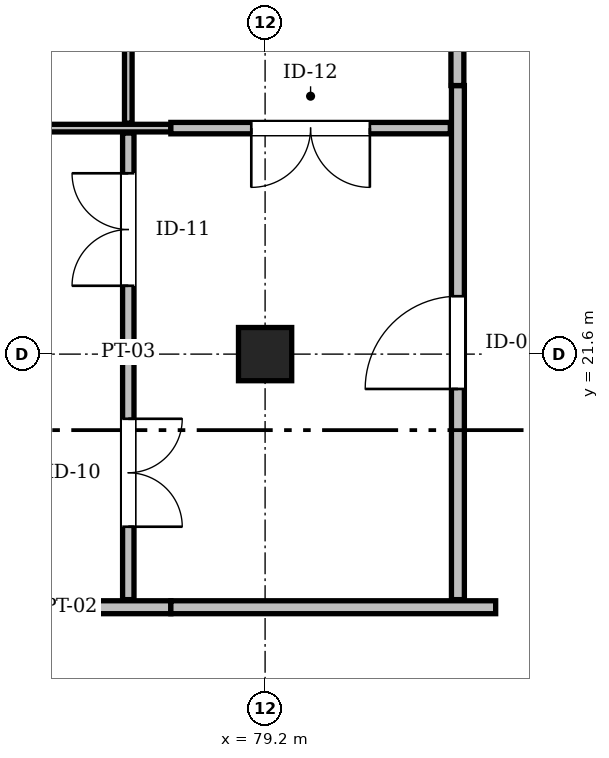
"""IFC4 building model, lengths in metres.
Left out: names, types, materials, properties, quantities, classifications, styles, units other than length and angle.
Written with IfcOpenShell. Run it as: python <this file> out.ifc"""

import sys

from ifc_helpers import new_model, si_unit, direction, frame, frame_2d, origin, origin_2d, place, context, subcontext, project, spatial, rectangle, extrude, element, fill, save


model = new_model("IFC4")
c1 = context("Model", 3, precision=1e-05, world=origin(), true_north=direction((0.0, 1.0)))
c2 = subcontext(c1, "Body", "Model", "MODEL_VIEW")
j1 = project(units=[si_unit("LENGTHUNIT", "METRE"), si_unit("PLANEANGLEUNIT", "RADIAN")], contexts=[c1])
p1 = place(None, origin())
s1 = spatial("IfcSite", under=j1, at=p1, CompositionType="ELEMENT")
p2 = place(p1, origin())
s2 = spatial("IfcBuilding", under=s1, at=p2, CompositionType="ELEMENT")
p3 = place(p2, frame((0.0, 0.0, 18.9)))
s3 = spatial("IfcBuildingStorey", under=s2, at=p3, CompositionType="ELEMENT", Elevation=18.9)
p4 = place(p3, frame((79.2, 21.6, 0.0), z_axis=(0.0, 0.0, 1.0), x_axis=(1.0, 0.0, 0.0)))
e1 = element("IfcColumn", 1, at=p4, inside=s3, PredefinedType="COLUMN", context=c2, shape_type="SweptSolid", body=[
    extrude(rectangle(XDim=0.7, YDim=0.7, at=origin_2d()), origin(), (0.0, 0.0, 1.0), 4.5),
])
p5 = place(p3, frame((60.981, 18.27, 0.0), z_axis=(0.0, 0.0, 1.0), x_axis=(1.0, 0.0, 0.0)))
e2 = element("IfcWall", 2, at=p5, inside=s3, PredefinedType="PARTITIONING", context=c2, shape_type="SweptSolid", body=[
    extrude(rectangle(XDim=16.979, YDim=0.17, at=frame_2d((8.489, 0.0))), origin(), (0.0, 0.0, 1.0), 4.16),
])
p6 = place(p5, frame((7.569, 0.0, 0.0)))
e3 = element("IfcOpeningElement", 3, at=p6, cuts=e2, PredefinedType="OPENING", context=c2, shape_type="SweptSolid", body=[
    extrude(rectangle(XDim=1.84, YDim=2.3, at=frame_2d((0.92, 1.15))), frame((0.0, 0.097, 0.0), z_axis=(0.0, -1.0, 0.0), x_axis=(1.0, 0.0, 0.0)), (0.0, 0.0, 1.0), 0.194),
])
p7 = place(p3, frame((77.96, 18.27, 0.0), z_axis=(0.0, 0.0, 1.0), x_axis=(1.0, 0.0, 0.0)))
e4 = element("IfcWall", 4, at=p7, inside=s3, PredefinedType="PARTITIONING", context=c2, shape_type="SweptSolid", body=[
    extrude(rectangle(XDim=4.274, YDim=0.17, at=frame_2d((2.137, 0.0))), origin(), (0.0, 0.0, 1.0), 4.16),
])
p8 = place(p3, frame((81.737, 18.37, 0.0), z_axis=(0.0, 0.0, 1.0), x_axis=(0.0, 1.0, 0.0)))
e5 = element("IfcWall", 5, at=p8, inside=s3, PredefinedType="PARTITIONING", context=c2, shape_type="SweptSolid", body=[
    extrude(rectangle(XDim=6.763, YDim=0.17, at=frame_2d((3.382, 0.0))), origin(), (0.0, 0.0, 1.0), 4.16),
])
p9 = place(p8, frame((2.771, 0.0, 0.0)))
e6 = element("IfcOpeningElement", 6, at=p9, cuts=e5, PredefinedType="OPENING", context=c2, shape_type="SweptSolid", body=[
    extrude(rectangle(XDim=1.22, YDim=2.22, at=frame_2d((0.61, 1.11))), frame((0.0, 0.097, 0.0), z_axis=(0.0, -1.0, 0.0), x_axis=(1.0, 0.0, 0.0)), (0.0, 0.0, 1.0), 0.194),
])
p10 = place(p3, frame((81.73, 25.133, 0.0), z_axis=(0.0, 0.0, 1.0), x_axis=(0.0, 1.0, 0.0)))
e7 = element("IfcWall", 7, at=p10, inside=s3, PredefinedType="PARTITIONING", context=c2, shape_type="SweptSolid", body=[
    extrude(rectangle(XDim=23.854, YDim=0.17, at=frame_2d((11.927, 0.0))), origin(), (0.0, 0.0, 1.0), 4.16),
])
p11 = place(p10, frame((11.187, 0.0, 0.0)))
e8 = element("IfcOpeningElement", 8, at=p11, cuts=e7, PredefinedType="OPENING", context=c2, shape_type="SweptSolid", body=[
    extrude(rectangle(XDim=1.48, YDim=2.26, at=frame_2d((0.74, 1.13))), frame((0.0, 0.097, 0.0), z_axis=(0.0, -1.0, 0.0), x_axis=(1.0, 0.0, 0.0)), (0.0, 0.0, 1.0), 0.194),
])
p12 = place(p10, frame((20.303, 0.0, 1.05)))
e9 = element("IfcOpeningElement", 9, at=p12, cuts=e7, PredefinedType="OPENING", context=c2, shape_type="SweptSolid", body=[
    extrude(rectangle(XDim=3.1, YDim=1.15, at=frame_2d((1.55, 0.575))), frame((0.0, 0.097, 0.0), z_axis=(0.0, -1.0, 0.0), x_axis=(1.0, 0.0, 0.0)), (0.0, 0.0, 1.0), 0.194),
])
p13 = place(p3, frame((60.97, 24.573, 0.0), z_axis=(0.0, 0.0, 1.0), x_axis=(1.0, 0.0, 0.0)))
e10 = element("IfcWall", 10, at=p13, inside=s3, PredefinedType="PARTITIONING", context=c2, shape_type="SweptSolid", body=[
    extrude(rectangle(XDim=16.99, YDim=0.1, at=frame_2d((8.495, 0.0))), origin(), (0.0, 0.0, 1.0), 4.16),
])
p14 = place(p13, frame((7.535, 0.0, 0.0)))
e11 = element("IfcOpeningElement", 11, at=p14, cuts=e10, PredefinedType="OPENING", context=c2, shape_type="SweptSolid", body=[
    extrude(rectangle(XDim=1.92, YDim=2.32, at=frame_2d((0.96, 1.16))), frame((0.0, 0.062, 0.0), z_axis=(0.0, -1.0, 0.0), x_axis=(1.0, 0.0, 0.0)), (0.0, 0.0, 1.0), 0.124),
])
p15 = place(p3, frame((77.4, 18.37, 0.0), z_axis=(0.0, 0.0, 1.0), x_axis=(0.0, 1.0, 0.0)))
e12 = element("IfcWall", 12, at=p15, inside=s3, PredefinedType="PARTITIONING", context=c2, shape_type="SweptSolid", body=[
    extrude(rectangle(XDim=6.138, YDim=0.15, at=frame_2d((3.069, 0.0))), origin(), (0.0, 0.0, 1.0), 4.16),
])
p16 = place(p15, frame((0.959, 0.0, 0.0)))
e13 = element("IfcOpeningElement", 13, at=p16, cuts=e12, PredefinedType="OPENING", context=c2, shape_type="SweptSolid", body=[
    extrude(rectangle(XDim=1.42, YDim=2.24, at=frame_2d((0.71, 1.12))), frame((0.0, 0.087, 0.0), z_axis=(0.0, -1.0, 0.0), x_axis=(1.0, 0.0, 0.0)), (0.0, 0.0, 1.0), 0.174),
])
p17 = place(p15, frame((4.129, 0.0, 0.0)))
e14 = element("IfcOpeningElement", 14, at=p17, cuts=e12, PredefinedType="OPENING", context=c2, shape_type="SweptSolid", body=[
    extrude(rectangle(XDim=1.48, YDim=2.26, at=frame_2d((0.74, 1.13))), frame((0.0, 0.087, 0.0), z_axis=(0.0, -1.0, 0.0), x_axis=(1.0, 0.0, 0.0)), (0.0, 0.0, 1.0), 0.174),
])
p18 = place(p3, frame((77.4, 24.638, 0.0), z_axis=(0.0, 0.0, 1.0), x_axis=(0.0, 1.0, 0.0)))
e15 = element("IfcWall", 15, at=p18, inside=s3, PredefinedType="PARTITIONING", context=c2, shape_type="SweptSolid", body=[
    extrude(rectangle(XDim=4.01, YDim=0.1, at=frame_2d((2.005, 0.0))), origin(), (0.0, 0.0, 1.0), 4.16),
])
p19 = place(p3, frame((77.96, 24.573, 0.0), z_axis=(0.0, 0.0, 1.0), x_axis=(1.0, 0.0, 0.0)))
e16 = element("IfcWall", 16, at=p19, inside=s3, PredefinedType="PARTITIONING", context=c2, shape_type="SweptSolid", body=[
    extrude(rectangle(XDim=3.677, YDim=0.15, at=frame_2d((1.838, 0.0))), origin(), (0.0, 0.0, 1.0), 4.16),
])
p20 = place(p19, frame((1.058, 0.0, 0.0)))
e17 = element("IfcOpeningElement", 17, at=p20, cuts=e16, PredefinedType="OPENING", context=c2, shape_type="SweptSolid", body=[
    extrude(rectangle(XDim=1.56, YDim=2.26, at=frame_2d((0.78, 1.13))), frame((0.0, 0.087, 0.0), z_axis=(0.0, -1.0, 0.0), x_axis=(1.0, 0.0, 0.0)), (0.0, 0.0, 1.0), 0.174),
])
p21 = place(p9, origin())
e18 = element("IfcDoor", 18, at=p21, inside=s3, OperationType="SINGLE_SWING_LEFT", PredefinedType="DOOR", context=c2, shape_type="SweptSolid", body=[
    extrude(rectangle(XDim=1.22, YDim=2.22, at=frame_2d((0.61, 1.11))), frame((0.0, 0.025, 0.0), z_axis=(0.0, -1.0, 0.0), x_axis=(1.0, 0.0, 0.0)), (0.0, 0.0, 1.0), 0.05),
])
fill(e6, e18)
p22 = place(p16, frame((1.42, 0.0, 0.0), z_axis=(0.0, 0.0, 1.0), x_axis=(-1.0, 0.0, 0.0)))
e19 = element("IfcDoor", 19, at=p22, inside=s3, OperationType="DOUBLE_DOOR_SINGLE_SWING", PredefinedType="DOOR", context=c2, shape_type="SweptSolid", body=[
    extrude(rectangle(XDim=1.42, YDim=2.24, at=frame_2d((0.71, 1.12))), frame((0.0, 0.025, 0.0), z_axis=(0.0, -1.0, 0.0), x_axis=(1.0, 0.0, 0.0)), (0.0, 0.0, 1.0), 0.05),
])
fill(e13, e19)
p23 = place(p17, origin())
e20 = element("IfcDoor", 20, at=p23, inside=s3, OperationType="DOUBLE_DOOR_SINGLE_SWING", PredefinedType="DOOR", context=c2, shape_type="SweptSolid", body=[
    extrude(rectangle(XDim=1.48, YDim=2.26, at=frame_2d((0.74, 1.13))), frame((0.0, 0.025, 0.0), z_axis=(0.0, -1.0, 0.0), x_axis=(1.0, 0.0, 0.0)), (0.0, 0.0, 1.0), 0.05),
])
fill(e14, e20)
p24 = place(p20, frame((1.56, 0.0, 0.0), z_axis=(0.0, 0.0, 1.0), x_axis=(-1.0, 0.0, 0.0)))
e21 = element("IfcDoor", 21, at=p24, inside=s3, OperationType="DOUBLE_DOOR_SINGLE_SWING", PredefinedType="DOOR", context=c2, shape_type="SweptSolid", body=[
    extrude(rectangle(XDim=1.56, YDim=2.26, at=frame_2d((0.78, 1.13))), frame((0.0, 0.025, 0.0), z_axis=(0.0, -1.0, 0.0), x_axis=(1.0, 0.0, 0.0)), (0.0, 0.0, 1.0), 0.05),
])
fill(e17, e21)
save(model, sys.argv[1])
